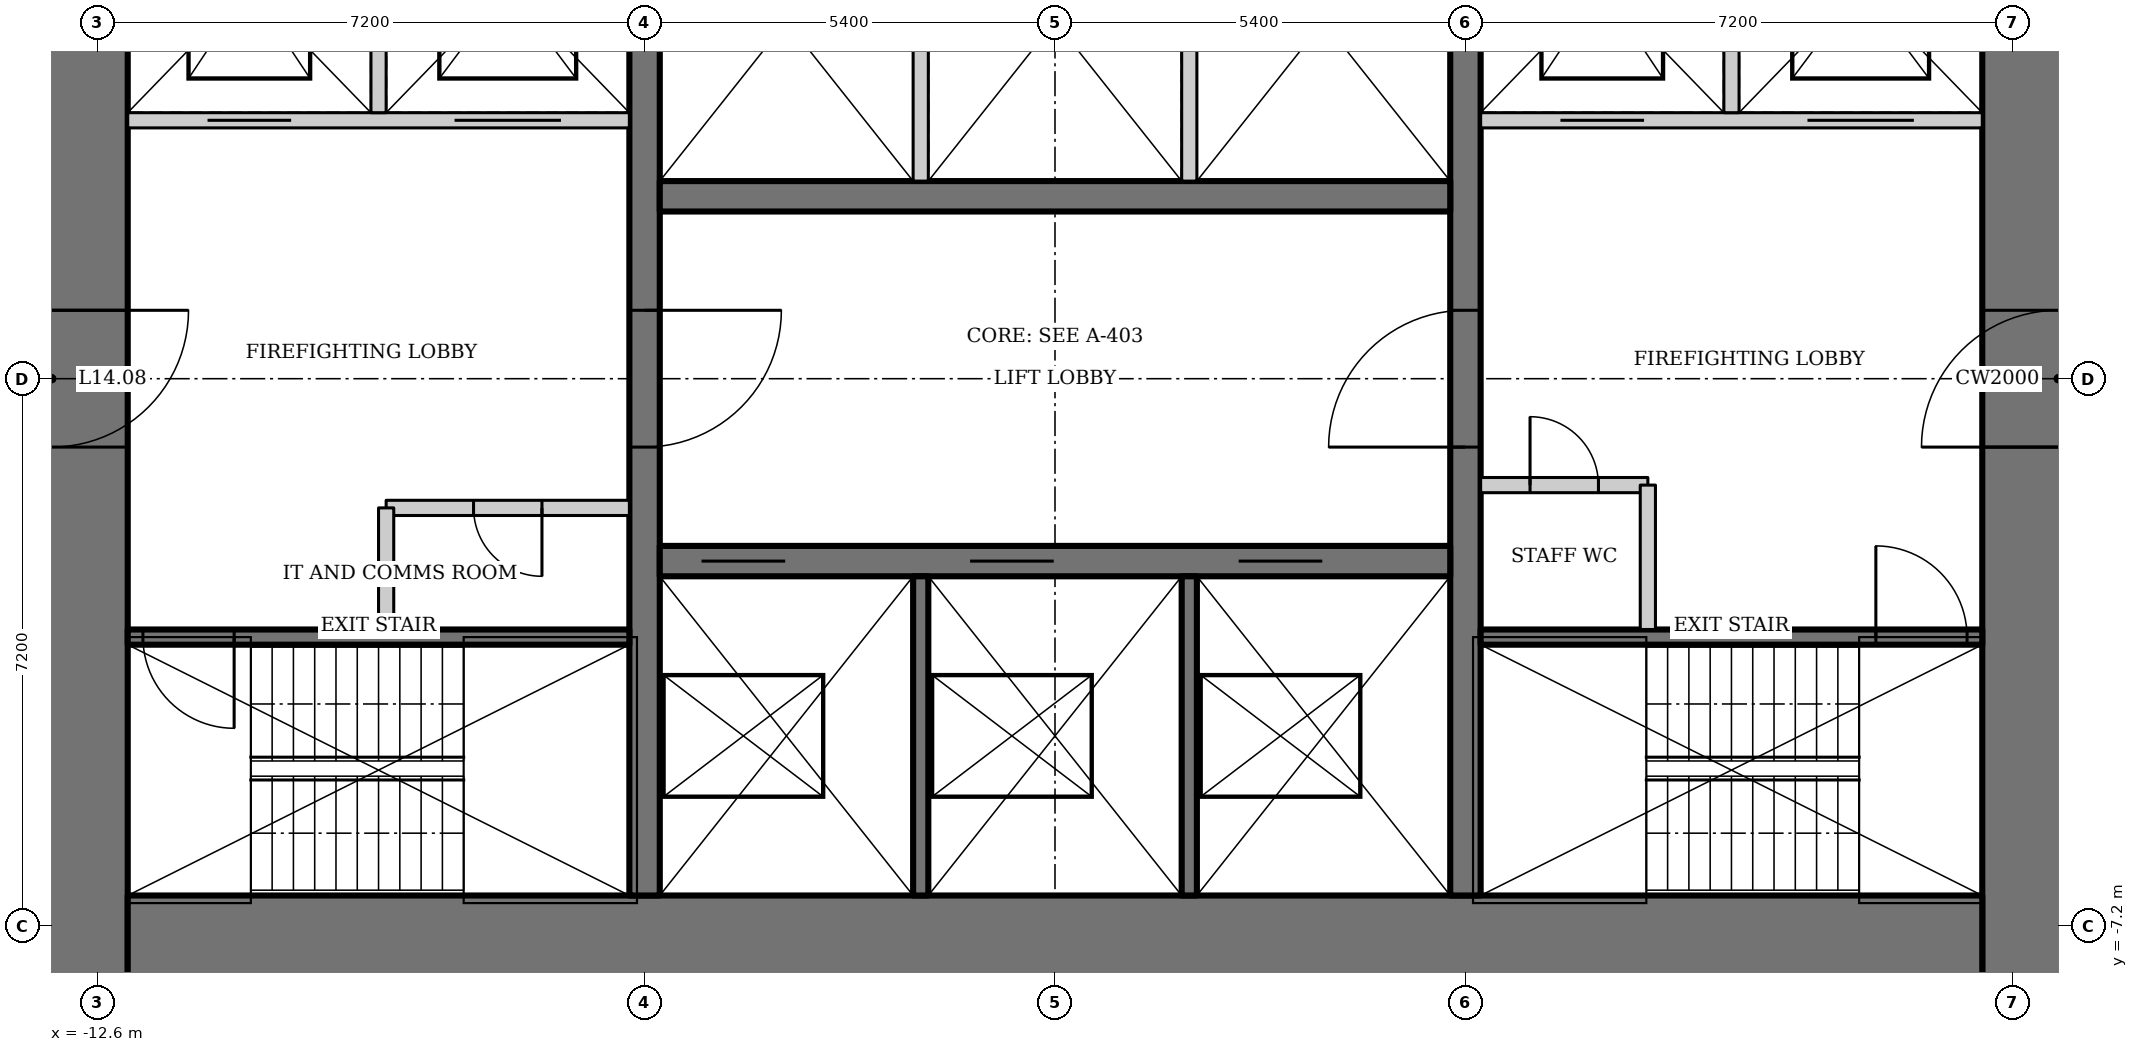
"""IFC4 building model, lengths in metres.
Left out: names, types, materials, properties, quantities, classifications, styles, units other than length and angle.
Written with IfcOpenShell. Run it as: python <this file> out.ifc"""

import sys

from ifc_helpers import new_model, si_unit, direction, frame, frame_2d, origin, place, context, subcontext, project, spatial, rectangle, extrude, element, fill, save


model = new_model("IFC4")
c1 = context("Model", 3, precision=1e-05, world=origin(), true_north=direction((0.0, 1.0)))
c2 = subcontext(c1, "Body", "Model", "MODEL_VIEW")
j1 = project(units=[si_unit("LENGTHUNIT", "METRE"), si_unit("PLANEANGLEUNIT", "RADIAN")], contexts=[c1])
p1 = place(None, origin())
s1 = spatial("IfcSite", under=j1, at=p1, CompositionType="ELEMENT")
p2 = place(p1, origin())
s2 = spatial("IfcBuilding", under=s1, at=p2, CompositionType="ELEMENT")
p3 = place(p2, frame((0.0, 0.0, 65.8)))
s3 = spatial("IfcBuildingStorey", under=s2, at=p3, CompositionType="ELEMENT", Elevation=65.8)
p4 = place(p3, frame((13.2, -13.0, 0.0), z_axis=(0.0, 0.0, 1.0), x_axis=(0.0, 1.0, 0.0)))
e1 = element("IfcWall", 1, at=p4, inside=s3, PredefinedType="SHEAR", context=c2, shape_type="SweptSolid", body=[
    extrude(rectangle(XDim=26.0, YDim=2.0, at=frame_2d((13.0, 0.0))), origin(), (0.0, 0.0, 1.0), 3.6),
])
p5 = place(p4, frame((12.1, 0.0, 0.0)))
e2 = element("IfcOpeningElement", 2, at=p5, cuts=e1, PredefinedType="OPENING", context=c2, shape_type="SweptSolid", body=[
    extrude(rectangle(XDim=1.8, YDim=2.1, at=frame_2d((0.9, 1.05))), frame((0.0, 1.01, 0.0), z_axis=(0.0, -1.0, 0.0), x_axis=(1.0, 0.0, 0.0)), (0.0, 0.0, 1.0), 2.02),
])
p6 = place(p3, frame((-13.2, 13.0, 0.0), z_axis=(0.0, 0.0, 1.0), x_axis=(0.0, -1.0, 0.0)))
e3 = element("IfcWall", 3, at=p6, inside=s3, PredefinedType="SHEAR", context=c2, shape_type="SweptSolid", body=[
    extrude(rectangle(XDim=26.0, YDim=2.0, at=frame_2d((13.0, 0.0))), origin(), (0.0, 0.0, 1.0), 3.6),
])
p7 = place(p6, frame((12.1, 0.0, 0.0)))
e4 = element("IfcOpeningElement", 4, at=p7, cuts=e3, PredefinedType="OPENING", context=c2, shape_type="SweptSolid", body=[
    extrude(rectangle(XDim=1.8, YDim=2.1, at=frame_2d((0.9, 1.05))), frame((0.0, 1.01, 0.0), z_axis=(0.0, -1.0, 0.0), x_axis=(1.0, 0.0, 0.0)), (0.0, 0.0, 1.0), 2.02),
])
p8 = place(p3, frame((-12.2, -8.0, 0.0), z_axis=(0.0, 0.0, 1.0), x_axis=(1.0, 0.0, 0.0)))
e5 = element("IfcWall", 5, at=p8, inside=s3, PredefinedType="SHEAR", context=c2, shape_type="SweptSolid", body=[
    extrude(rectangle(XDim=24.4, YDim=2.4, at=frame_2d((12.2, 0.0))), origin(), (0.0, 0.0, 1.0), 3.6),
])
p9 = place(p3, frame((5.4, -6.8, 0.0), z_axis=(0.0, 0.0, 1.0), x_axis=(0.0, 1.0, 0.0)))
e6 = element("IfcWall", 6, at=p9, inside=s3, PredefinedType="SHEAR", context=c2, shape_type="SweptSolid", body=[
    extrude(rectangle(XDim=13.6, YDim=0.4, at=frame_2d((6.8, 0.0))), origin(), (0.0, 0.0, 1.0), 3.6),
])
p10 = place(p9, frame((5.9, 0.0, 0.0)))
e7 = element("IfcOpeningElement", 7, at=p10, cuts=e6, PredefinedType="OPENING", context=c2, shape_type="SweptSolid", body=[
    extrude(rectangle(XDim=1.8, YDim=2.1, at=frame_2d((0.9, 1.05))), frame((0.0, 0.21, 0.0), z_axis=(0.0, -1.0, 0.0), x_axis=(1.0, 0.0, 0.0)), (0.0, 0.0, 1.0), 0.42),
])
p11 = place(p3, frame((-5.4, 6.8, 0.0), z_axis=(0.0, 0.0, 1.0), x_axis=(0.0, -1.0, 0.0)))
e8 = element("IfcWall", 8, at=p11, inside=s3, PredefinedType="SHEAR", context=c2, shape_type="SweptSolid", body=[
    extrude(rectangle(XDim=13.6, YDim=0.4, at=frame_2d((6.8, 0.0))), origin(), (0.0, 0.0, 1.0), 3.6),
])
p12 = place(p11, frame((5.9, 0.0, 0.0)))
e9 = element("IfcOpeningElement", 9, at=p12, cuts=e8, PredefinedType="OPENING", context=c2, shape_type="SweptSolid", body=[
    extrude(rectangle(XDim=1.8, YDim=2.1, at=frame_2d((0.9, 1.05))), frame((0.0, 0.21, 0.0), z_axis=(0.0, -1.0, 0.0), x_axis=(1.0, 0.0, 0.0)), (0.0, 0.0, 1.0), 0.42),
])
p13 = place(p3, frame((-5.2, -2.4, 0.0), z_axis=(0.0, 0.0, 1.0), x_axis=(1.0, 0.0, 0.0)))
e10 = element("IfcWall", 10, at=p13, inside=s3, PredefinedType="SHEAR", context=c2, shape_type="SweptSolid", body=[
    extrude(rectangle(XDim=10.4, YDim=0.4, at=frame_2d((5.2, 0.0))), origin(), (0.0, 0.0, 1.0), 3.6),
])
p14 = place(p13, frame((0.55, 0.0, 0.0)))
e11 = element("IfcOpeningElement", 11, at=p14, cuts=e10, PredefinedType="OPENING", context=c2, shape_type="SweptSolid", body=[
    extrude(rectangle(XDim=1.1, YDim=2.2, at=frame_2d((0.55, 1.1))), frame((0.0, 0.21, 0.0), z_axis=(0.0, -1.0, 0.0), x_axis=(1.0, 0.0, 0.0)), (0.0, 0.0, 1.0), 0.42),
])
p15 = place(p13, frame((4.083, 0.0, 0.0)))
e12 = element("IfcOpeningElement", 12, at=p15, cuts=e10, PredefinedType="OPENING", context=c2, shape_type="SweptSolid", body=[
    extrude(rectangle(XDim=1.1, YDim=2.2, at=frame_2d((0.55, 1.1))), frame((0.0, 0.21, 0.0), z_axis=(0.0, -1.0, 0.0), x_axis=(1.0, 0.0, 0.0)), (0.0, 0.0, 1.0), 0.42),
])
p16 = place(p13, frame((7.617, 0.0, 0.0)))
e13 = element("IfcOpeningElement", 13, at=p16, cuts=e10, PredefinedType="OPENING", context=c2, shape_type="SweptSolid", body=[
    extrude(rectangle(XDim=1.1, YDim=2.2, at=frame_2d((0.55, 1.1))), frame((0.0, 0.21, 0.0), z_axis=(0.0, -1.0, 0.0), x_axis=(1.0, 0.0, 0.0)), (0.0, 0.0, 1.0), 0.42),
])
for number, where, z_axis, x_axis in (
    (14, (-1.767, -2.6, 0.0), (0.0, 0.0, 1.0), (0.0, -1.0, 0.0)),
    (15, (1.767, -2.6, 0.0), (0.0, 0.0, 1.0), (0.0, -1.0, 0.0)),
):
    element("IfcWall", number, at=place(p3, frame(where, z_axis=z_axis, x_axis=x_axis)), inside=s3, PredefinedType="SOLIDWALL", context=c2, shape_type="SweptSolid", body=[
        extrude(rectangle(XDim=4.2, YDim=0.2, at=frame_2d((2.1, 0.0))), origin(), (0.0, 0.0, 1.0), 3.6),
    ])
p17 = place(p3, frame((5.2, 2.4, 0.0), z_axis=(0.0, 0.0, 1.0), x_axis=(-1.0, 0.0, 0.0)))
e16 = element("IfcWall", 16, at=p17, inside=s3, PredefinedType="SHEAR", context=c2, shape_type="SweptSolid", body=[
    extrude(rectangle(XDim=10.4, YDim=0.4, at=frame_2d((5.2, 0.0))), origin(), (0.0, 0.0, 1.0), 3.6),
])
for number, where, z_axis, x_axis in (
    (17, (-1.767, 2.6, 0.0), (0.0, 0.0, 1.0), (0.0, 1.0, 0.0)),
    (18, (1.767, 2.6, 0.0), (0.0, 0.0, 1.0), (0.0, 1.0, 0.0)),
):
    element("IfcWall", number, at=place(p3, frame(where, z_axis=z_axis, x_axis=x_axis)), inside=s3, PredefinedType="SOLIDWALL", context=c2, shape_type="SweptSolid", body=[
        extrude(rectangle(XDim=4.2, YDim=0.2, at=frame_2d((2.1, 0.0))), origin(), (0.0, 0.0, 1.0), 3.6),
    ])
p18 = place(p3, frame((5.6, -3.4, 0.0), z_axis=(0.0, 0.0, 1.0), x_axis=(1.0, 0.0, 0.0)))
e19 = element("IfcWall", 19, at=p18, inside=s3, PredefinedType="SHEAR", context=c2, shape_type="SweptSolid", body=[
    extrude(rectangle(XDim=6.6, YDim=0.2, at=frame_2d((3.3, 0.0))), origin(), (0.0, 0.0, 1.0), 3.6),
])
p19 = place(p18, frame((5.2, 0.0, 0.0)))
e20 = element("IfcOpeningElement", 20, at=p19, cuts=e19, PredefinedType="OPENING", context=c2, shape_type="SweptSolid", body=[
    extrude(rectangle(XDim=1.2, YDim=2.1, at=frame_2d((0.6, 1.05))), frame((0.0, 0.11, 0.0), z_axis=(0.0, -1.0, 0.0), x_axis=(1.0, 0.0, 0.0)), (0.0, 0.0, 1.0), 0.22),
])
p20 = place(p3, frame((12.2, 3.4, 0.0), z_axis=(0.0, 0.0, 1.0), x_axis=(-1.0, 0.0, 0.0)))
e21 = element("IfcWall", 21, at=p20, inside=s3, PredefinedType="SOLIDWALL", context=c2, shape_type="SweptSolid", body=[
    extrude(rectangle(XDim=6.6, YDim=0.2, at=frame_2d((3.3, 0.0))), origin(), (0.0, 0.0, 1.0), 3.6),
])
p21 = place(p20, frame((4.45, 0.0, 0.0)))
e22 = element("IfcOpeningElement", 22, at=p21, cuts=e21, PredefinedType="OPENING", context=c2, shape_type="SweptSolid", body=[
    extrude(rectangle(XDim=1.1, YDim=2.2, at=frame_2d((0.55, 1.1))), frame((0.0, 0.11, 0.0), z_axis=(0.0, -1.0, 0.0), x_axis=(1.0, 0.0, 0.0)), (0.0, 0.0, 1.0), 0.22),
])
p22 = place(p20, frame((0.9, 0.0, 0.0)))
e23 = element("IfcOpeningElement", 23, at=p22, cuts=e21, PredefinedType="OPENING", context=c2, shape_type="SweptSolid", body=[
    extrude(rectangle(XDim=1.4, YDim=2.2, at=frame_2d((0.7, 1.1))), frame((0.0, 0.11, 0.0), z_axis=(0.0, -1.0, 0.0), x_axis=(1.0, 0.0, 0.0)), (0.0, 0.0, 1.0), 0.22),
])
p23 = place(p3, frame((8.9, 3.5, 0.0), z_axis=(0.0, 0.0, 1.0), x_axis=(0.0, 1.0, 0.0)))
e24 = element("IfcWall", 24, at=p23, inside=s3, PredefinedType="SOLIDWALL", context=c2, shape_type="SweptSolid", body=[
    extrude(rectangle(XDim=3.3, YDim=0.2, at=frame_2d((1.65, 0.0))), origin(), (0.0, 0.0, 1.0), 3.6),
])
p24 = place(p3, frame((-5.6, -3.4, 0.0), z_axis=(0.0, 0.0, 1.0), x_axis=(-1.0, 0.0, 0.0)))
e25 = element("IfcWall", 25, at=p24, inside=s3, PredefinedType="SHEAR", context=c2, shape_type="SweptSolid", body=[
    extrude(rectangle(XDim=6.6, YDim=0.2, at=frame_2d((3.3, 0.0))), origin(), (0.0, 0.0, 1.0), 3.6),
])
p25 = place(p24, frame((5.2, 0.0, 0.0)))
e26 = element("IfcOpeningElement", 26, at=p25, cuts=e25, PredefinedType="OPENING", context=c2, shape_type="SweptSolid", body=[
    extrude(rectangle(XDim=1.2, YDim=2.1, at=frame_2d((0.6, 1.05))), frame((0.0, 0.11, 0.0), z_axis=(0.0, -1.0, 0.0), x_axis=(1.0, 0.0, 0.0)), (0.0, 0.0, 1.0), 0.22),
])
p26 = place(p3, frame((-12.2, 3.4, 0.0), z_axis=(0.0, 0.0, 1.0), x_axis=(1.0, 0.0, 0.0)))
e27 = element("IfcWall", 27, at=p26, inside=s3, PredefinedType="SOLIDWALL", context=c2, shape_type="SweptSolid", body=[
    extrude(rectangle(XDim=6.6, YDim=0.2, at=frame_2d((3.3, 0.0))), origin(), (0.0, 0.0, 1.0), 3.6),
])
p27 = place(p26, frame((1.05, 0.0, 0.0)))
e28 = element("IfcOpeningElement", 28, at=p27, cuts=e27, PredefinedType="OPENING", context=c2, shape_type="SweptSolid", body=[
    extrude(rectangle(XDim=1.1, YDim=2.2, at=frame_2d((0.55, 1.1))), frame((0.0, 0.11, 0.0), z_axis=(0.0, -1.0, 0.0), x_axis=(1.0, 0.0, 0.0)), (0.0, 0.0, 1.0), 0.22),
])
p28 = place(p26, frame((4.3, 0.0, 0.0)))
e29 = element("IfcOpeningElement", 29, at=p28, cuts=e27, PredefinedType="OPENING", context=c2, shape_type="SweptSolid", body=[
    extrude(rectangle(XDim=1.4, YDim=2.2, at=frame_2d((0.7, 1.1))), frame((0.0, 0.11, 0.0), z_axis=(0.0, -1.0, 0.0), x_axis=(1.0, 0.0, 0.0)), (0.0, 0.0, 1.0), 0.22),
])
p29 = place(p3, frame((-8.9, 3.5, 0.0), z_axis=(0.0, 0.0, 1.0), x_axis=(0.0, 1.0, 0.0)))
e30 = element("IfcWall", 30, at=p29, inside=s3, PredefinedType="SOLIDWALL", context=c2, shape_type="SweptSolid", body=[
    extrude(rectangle(XDim=3.3, YDim=0.2, at=frame_2d((1.65, 0.0))), origin(), (0.0, 0.0, 1.0), 3.6),
])
p30 = place(p3, frame((-5.6, -1.7, 0.0), z_axis=(0.0, 0.0, 1.0), x_axis=(-1.0, 0.0, 0.0)))
e31 = element("IfcWall", 31, at=p30, inside=s3, PredefinedType="SOLIDWALL", context=c2, shape_type="SweptSolid", body=[
    extrude(rectangle(XDim=3.2, YDim=0.2, at=frame_2d((1.6, 0.0))), origin(), (0.0, 0.0, 1.0), 3.45),
])
p31 = place(p30, frame((1.15, 0.0, 0.0)))
e32 = element("IfcOpeningElement", 32, at=p31, cuts=e31, PredefinedType="OPENING", context=c2, shape_type="SweptSolid", body=[
    extrude(rectangle(XDim=0.9, YDim=2.1, at=frame_2d((0.45, 1.05))), frame((0.0, 0.11, 0.0), z_axis=(0.0, -1.0, 0.0), x_axis=(1.0, 0.0, 0.0)), (0.0, 0.0, 1.0), 0.22),
])
p32 = place(p3, frame((-8.8, -1.7, 0.0), z_axis=(0.0, 0.0, 1.0), x_axis=(0.0, -1.0, 0.0)))
e33 = element("IfcWall", 33, at=p32, inside=s3, PredefinedType="SOLIDWALL", context=c2, shape_type="SweptSolid", body=[
    extrude(rectangle(XDim=1.6, YDim=0.2, at=frame_2d((0.8, 0.0))), origin(), (0.0, 0.0, 1.0), 3.45),
])
p33 = place(p3, frame((5.6, -1.4, 0.0), z_axis=(0.0, 0.0, 1.0), x_axis=(1.0, 0.0, 0.0)))
e34 = element("IfcWall", 34, at=p33, inside=s3, PredefinedType="SOLIDWALL", context=c2, shape_type="SweptSolid", body=[
    extrude(rectangle(XDim=2.2, YDim=0.2, at=frame_2d((1.1, 0.0))), origin(), (0.0, 0.0, 1.0), 3.45),
])
p34 = place(p33, frame((0.65, 0.0, 0.0)))
e35 = element("IfcOpeningElement", 35, at=p34, cuts=e34, PredefinedType="OPENING", context=c2, shape_type="SweptSolid", body=[
    extrude(rectangle(XDim=0.9, YDim=2.1, at=frame_2d((0.45, 1.05))), frame((0.0, 0.11, 0.0), z_axis=(0.0, -1.0, 0.0), x_axis=(1.0, 0.0, 0.0)), (0.0, 0.0, 1.0), 0.22),
])
p35 = place(p3, frame((7.8, -1.4, 0.0), z_axis=(0.0, 0.0, 1.0), x_axis=(0.0, -1.0, 0.0)))
e36 = element("IfcWall", 36, at=p35, inside=s3, PredefinedType="SOLIDWALL", context=c2, shape_type="SweptSolid", body=[
    extrude(rectangle(XDim=1.9, YDim=0.2, at=frame_2d((0.95, 0.0))), origin(), (0.0, 0.0, 1.0), 3.45),
])
p36 = place(p31, origin())
e37 = element("IfcDoor", 37, at=p36, inside=s3, OperationType="SINGLE_SWING_LEFT", PredefinedType="DOOR", context=c2, shape_type="SweptSolid", body=[
    extrude(rectangle(XDim=0.9, YDim=2.1, at=frame_2d((0.45, 1.05))), frame((0.0, 0.025, 0.0), z_axis=(0.0, -1.0, 0.0), x_axis=(1.0, 0.0, 0.0)), (0.0, 0.0, 1.0), 0.05),
])
fill(e32, e37)
p37 = place(p34, origin())
e38 = element("IfcDoor", 38, at=p37, inside=s3, OperationType="SINGLE_SWING_LEFT", PredefinedType="DOOR", context=c2, shape_type="SweptSolid", body=[
    extrude(rectangle(XDim=0.9, YDim=2.1, at=frame_2d((0.45, 1.05))), frame((0.0, 0.025, 0.0), z_axis=(0.0, -1.0, 0.0), x_axis=(1.0, 0.0, 0.0)), (0.0, 0.0, 1.0), 0.05),
])
fill(e35, e38)
p38 = place(p10, origin())
e39 = element("IfcDoor", 39, at=p38, inside=s3, OperationType="DOUBLE_DOOR_DOUBLE_SWING", PredefinedType="DOOR", context=c2, shape_type="SweptSolid", body=[
    extrude(rectangle(XDim=1.8, YDim=2.1, at=frame_2d((0.9, 1.05))), frame((0.0, 0.025, 0.0), z_axis=(0.0, -1.0, 0.0), x_axis=(1.0, 0.0, 0.0)), (0.0, 0.0, 1.0), 0.05),
])
fill(e7, e39)
p39 = place(p12, origin())
e40 = element("IfcDoor", 40, at=p39, inside=s3, OperationType="DOUBLE_DOOR_DOUBLE_SWING", PredefinedType="DOOR", context=c2, shape_type="SweptSolid", body=[
    extrude(rectangle(XDim=1.8, YDim=2.1, at=frame_2d((0.9, 1.05))), frame((0.0, 0.025, 0.0), z_axis=(0.0, -1.0, 0.0), x_axis=(1.0, 0.0, 0.0)), (0.0, 0.0, 1.0), 0.05),
])
fill(e9, e40)
p40 = place(p19, origin())
e41 = element("IfcDoor", 41, at=p40, inside=s3, OperationType="SINGLE_SWING_RIGHT", PredefinedType="DOOR", context=c2, shape_type="SweptSolid", body=[
    extrude(rectangle(XDim=1.2, YDim=2.1, at=frame_2d((0.6, 1.05))), frame((0.0, 0.025, 0.0), z_axis=(0.0, -1.0, 0.0), x_axis=(1.0, 0.0, 0.0)), (0.0, 0.0, 1.0), 0.05),
])
fill(e20, e41)
p41 = place(p25, origin())
e42 = element("IfcDoor", 42, at=p41, inside=s3, OperationType="SINGLE_SWING_RIGHT", PredefinedType="DOOR", context=c2, shape_type="SweptSolid", body=[
    extrude(rectangle(XDim=1.2, YDim=2.1, at=frame_2d((0.6, 1.05))), frame((0.0, 0.025, 0.0), z_axis=(0.0, -1.0, 0.0), x_axis=(1.0, 0.0, 0.0)), (0.0, 0.0, 1.0), 0.05),
])
fill(e26, e42)
p42 = place(p5, origin())
e43 = element("IfcDoor", 43, at=p42, inside=s3, OperationType="DOUBLE_DOOR_DOUBLE_SWING", PredefinedType="DOOR", context=c2, shape_type="SweptSolid", body=[
    extrude(rectangle(XDim=1.8, YDim=2.1, at=frame_2d((0.9, 1.05))), frame((0.0, 0.025, 0.0), z_axis=(0.0, -1.0, 0.0), x_axis=(1.0, 0.0, 0.0)), (0.0, 0.0, 1.0), 0.05),
])
fill(e2, e43)
p43 = place(p7, origin())
e44 = element("IfcDoor", 44, at=p43, inside=s3, OperationType="DOUBLE_DOOR_DOUBLE_SWING", PredefinedType="DOOR", context=c2, shape_type="SweptSolid", body=[
    extrude(rectangle(XDim=1.8, YDim=2.1, at=frame_2d((0.9, 1.05))), frame((0.0, 0.025, 0.0), z_axis=(0.0, -1.0, 0.0), x_axis=(1.0, 0.0, 0.0)), (0.0, 0.0, 1.0), 0.05),
])
fill(e4, e44)
p44 = place(p14, origin())
e45 = element("IfcDoor", 45, at=p44, inside=s3, OperationType="DOUBLE_DOOR_SLIDING", PredefinedType="DOOR", context=c2, shape_type="SweptSolid", body=[
    extrude(rectangle(XDim=1.1, YDim=2.2, at=frame_2d((0.55, 1.1))), frame((0.0, 0.025, 0.0), z_axis=(0.0, -1.0, 0.0), x_axis=(1.0, 0.0, 0.0)), (0.0, 0.0, 1.0), 0.05),
])
fill(e11, e45)
p45 = place(p15, origin())
e46 = element("IfcDoor", 46, at=p45, inside=s3, OperationType="DOUBLE_DOOR_SLIDING", PredefinedType="DOOR", context=c2, shape_type="SweptSolid", body=[
    extrude(rectangle(XDim=1.1, YDim=2.2, at=frame_2d((0.55, 1.1))), frame((0.0, 0.025, 0.0), z_axis=(0.0, -1.0, 0.0), x_axis=(1.0, 0.0, 0.0)), (0.0, 0.0, 1.0), 0.05),
])
fill(e12, e46)
p46 = place(p16, origin())
e47 = element("IfcDoor", 47, at=p46, inside=s3, OperationType="DOUBLE_DOOR_SLIDING", PredefinedType="DOOR", context=c2, shape_type="SweptSolid", body=[
    extrude(rectangle(XDim=1.1, YDim=2.2, at=frame_2d((0.55, 1.1))), frame((0.0, 0.025, 0.0), z_axis=(0.0, -1.0, 0.0), x_axis=(1.0, 0.0, 0.0)), (0.0, 0.0, 1.0), 0.05),
])
fill(e13, e47)
p47 = place(p27, origin())
e48 = element("IfcDoor", 48, at=p47, inside=s3, OperationType="DOUBLE_DOOR_SLIDING", PredefinedType="DOOR", context=c2, shape_type="SweptSolid", body=[
    extrude(rectangle(XDim=1.1, YDim=2.2, at=frame_2d((0.55, 1.1))), frame((0.0, 0.025, 0.0), z_axis=(0.0, -1.0, 0.0), x_axis=(1.0, 0.0, 0.0)), (0.0, 0.0, 1.0), 0.05),
])
fill(e28, e48)
p48 = place(p28, origin())
e49 = element("IfcDoor", 49, at=p48, inside=s3, OperationType="DOUBLE_DOOR_SLIDING", PredefinedType="DOOR", context=c2, shape_type="SweptSolid", body=[
    extrude(rectangle(XDim=1.4, YDim=2.2, at=frame_2d((0.7, 1.1))), frame((0.0, 0.025, 0.0), z_axis=(0.0, -1.0, 0.0), x_axis=(1.0, 0.0, 0.0)), (0.0, 0.0, 1.0), 0.05),
])
fill(e29, e49)
p49 = place(p21, origin())
e50 = element("IfcDoor", 50, at=p49, inside=s3, OperationType="DOUBLE_DOOR_SLIDING", PredefinedType="DOOR", context=c2, shape_type="SweptSolid", body=[
    extrude(rectangle(XDim=1.1, YDim=2.2, at=frame_2d((0.55, 1.1))), frame((0.0, 0.025, 0.0), z_axis=(0.0, -1.0, 0.0), x_axis=(1.0, 0.0, 0.0)), (0.0, 0.0, 1.0), 0.05),
])
fill(e22, e50)
p50 = place(p22, origin())
e51 = element("IfcDoor", 51, at=p50, inside=s3, OperationType="DOUBLE_DOOR_SLIDING", PredefinedType="DOOR", context=c2, shape_type="SweptSolid", body=[
    extrude(rectangle(XDim=1.4, YDim=2.2, at=frame_2d((0.7, 1.1))), frame((0.0, 0.025, 0.0), z_axis=(0.0, -1.0, 0.0), x_axis=(1.0, 0.0, 0.0)), (0.0, 0.0, 1.0), 0.05),
])
fill(e23, e51)
save(model, sys.argv[1])
